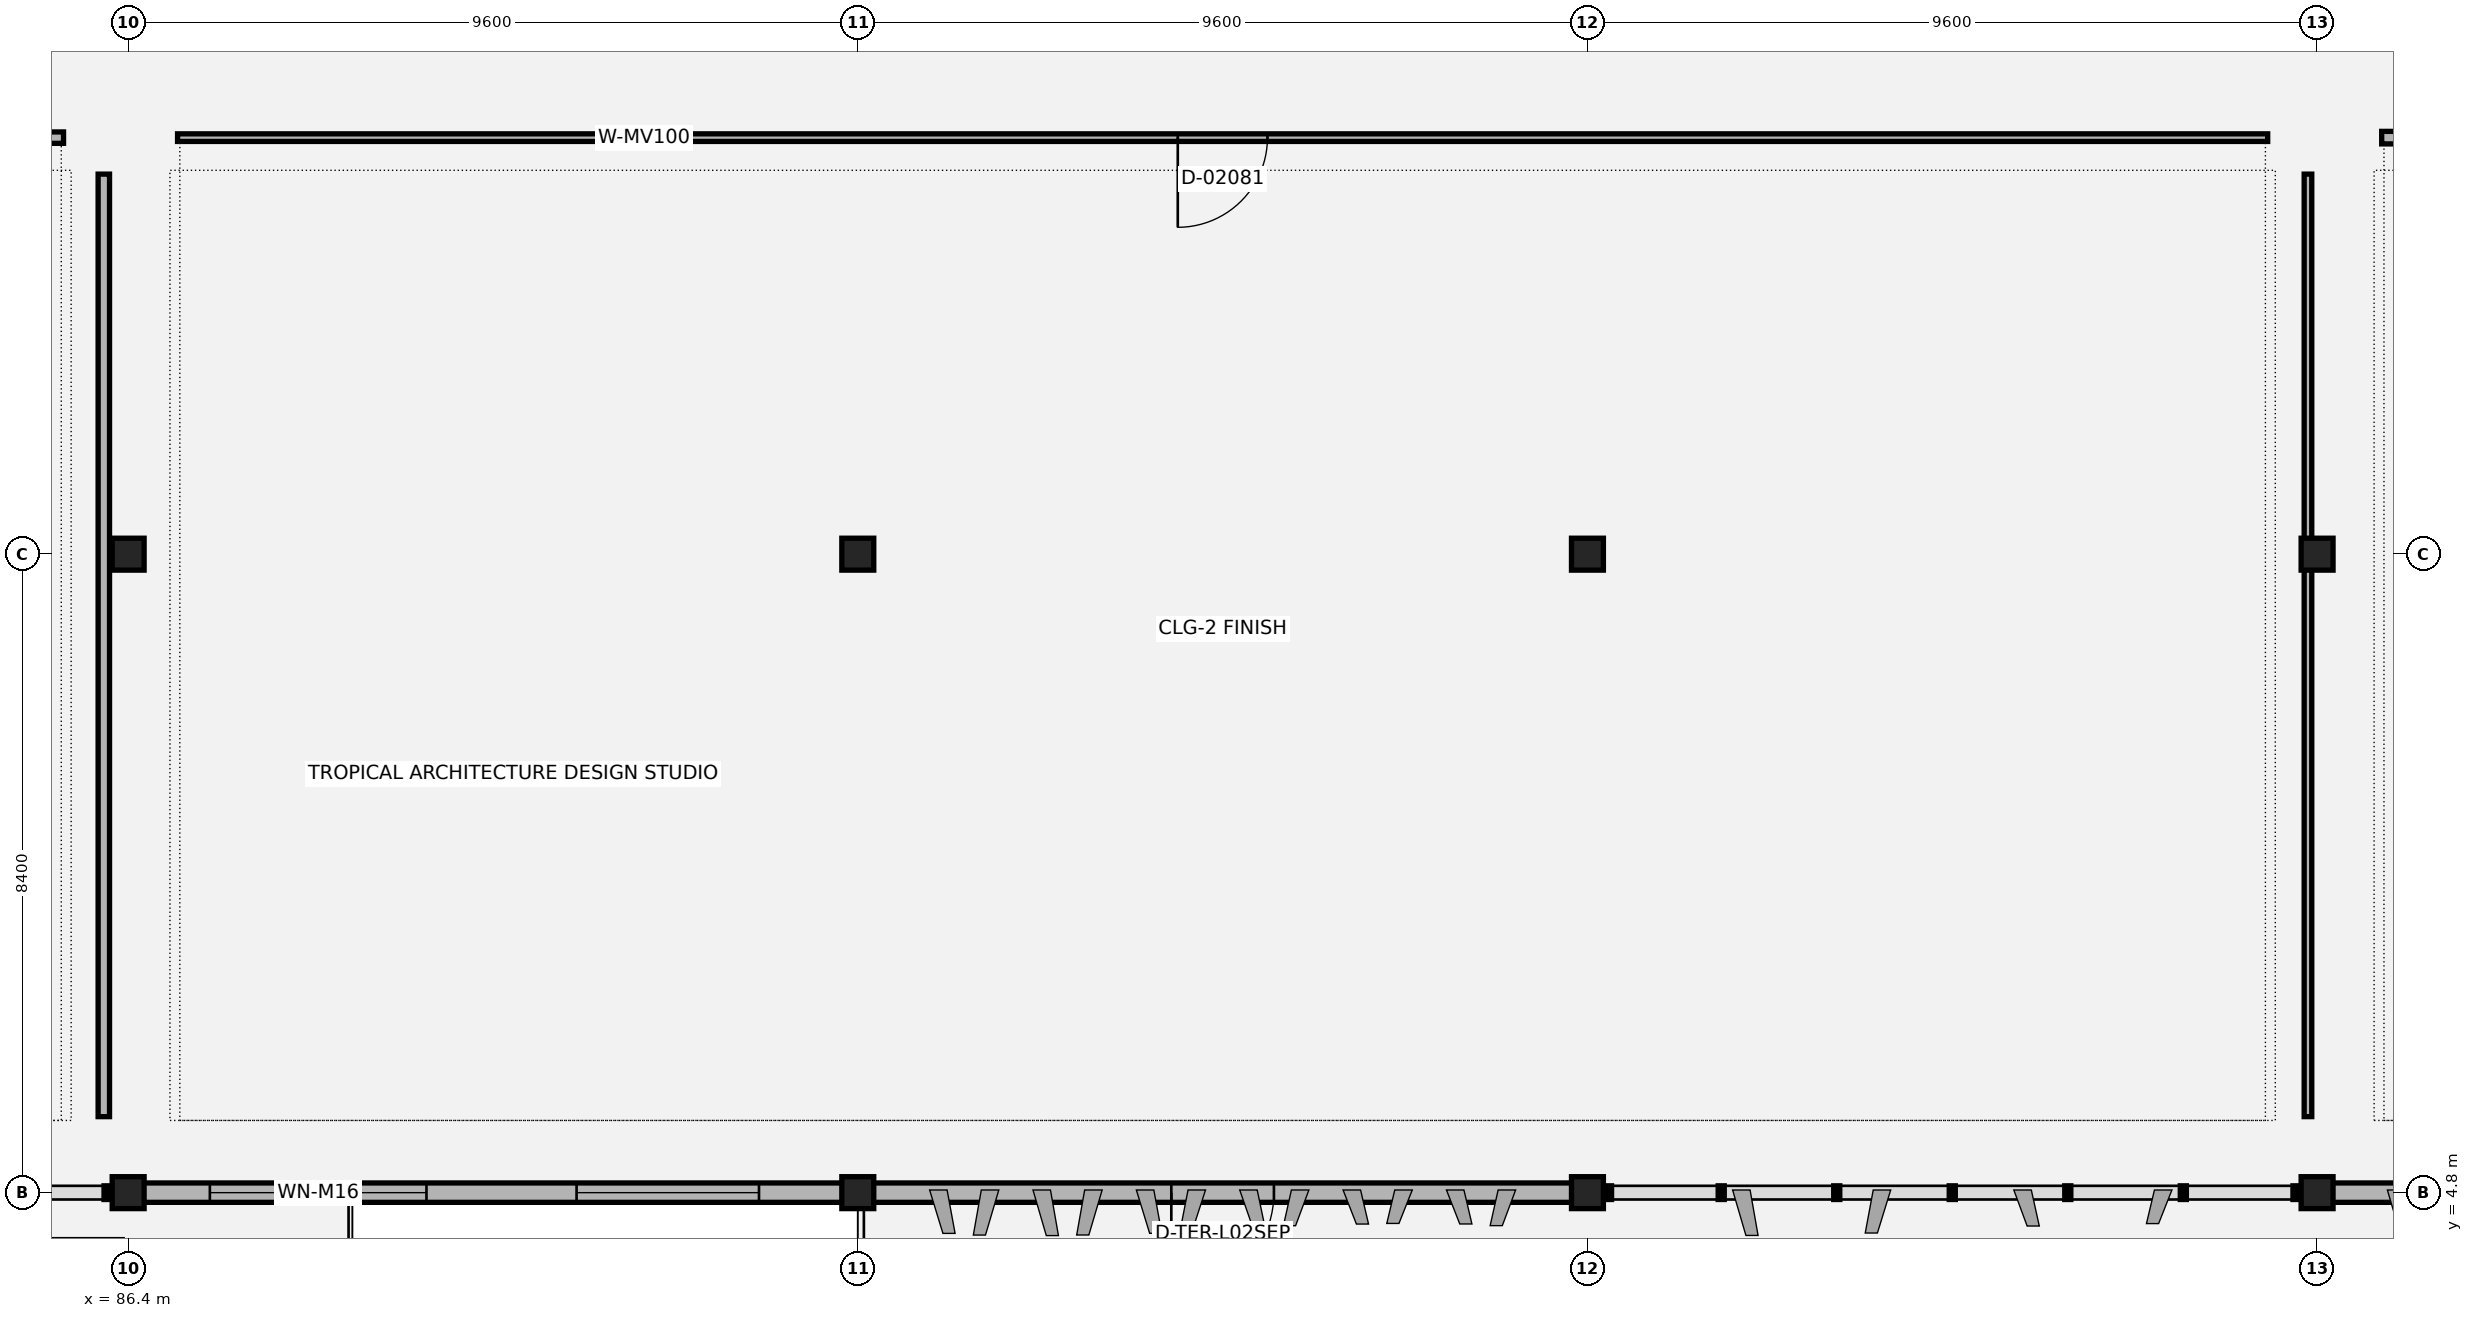
"""IFC4 building model, lengths in metres.
Left out: names, types, materials, properties, quantities, classifications, styles, units other than length and angle.
Written with IfcOpenShell. Run it as: python <this file> out.ifc"""

import sys

from ifc_helpers import new_model, si_unit, direction, frame, frame_2d, origin, origin_2d, place, context, subcontext, project, spatial, rectangle, extrude, element, fill, save


model = new_model("IFC4")
c1 = context("Model", 3, precision=1e-05, world=origin(), true_north=direction((0.0, 1.0)))
c2 = subcontext(c1, "Body", "Model", "MODEL_VIEW")
j1 = project(units=[si_unit("LENGTHUNIT", "METRE"), si_unit("PLANEANGLEUNIT", "RADIAN")], contexts=[c1])
p1 = place(None, origin())
s1 = spatial("IfcSite", under=j1, at=p1, CompositionType="ELEMENT")
p2 = place(p1, origin())
s2 = spatial("IfcBuilding", under=s1, at=p2, CompositionType="ELEMENT")
p3 = place(p2, frame((0.0, 0.0, 10.2)))
s3 = spatial("IfcBuildingStorey", under=s2, at=p3, CompositionType="ELEMENT", Elevation=10.2)
for number, where, z_axis, x_axis in (
    (1, (86.4, 4.8, 0.0), (0.0, 0.0, 1.0), (1.0, 0.0, 0.0)),
    (2, (86.4, 13.2, 0.0), (0.0, 0.0, 1.0), (1.0, 0.0, 0.0)),
    (3, (96.0, 4.8, 0.0), (0.0, 0.0, 1.0), (1.0, 0.0, 0.0)),
    (4, (96.0, 13.2, 0.0), (0.0, 0.0, 1.0), (1.0, 0.0, 0.0)),
    (5, (105.6, 4.8, 0.0), (0.0, 0.0, 1.0), (1.0, 0.0, 0.0)),
    (6, (105.6, 13.2, 0.0), (0.0, 0.0, 1.0), (1.0, 0.0, 0.0)),
    (7, (115.2, 4.8, 0.0), (0.0, 0.0, 1.0), (1.0, 0.0, 0.0)),
    (8, (115.2, 13.2, 0.0), (0.0, 0.0, 1.0), (1.0, 0.0, 0.0)),
):
    element("IfcColumn", number, at=place(p3, frame(where, z_axis=z_axis, x_axis=x_axis)), inside=s3, PredefinedType="COLUMN", context=c2, shape_type="SweptSolid", body=[
        extrude(rectangle(XDim=0.42, YDim=0.42, at=origin_2d()), origin(), (0.0, 0.0, 1.0), 4.2),
    ])
p4 = place(p3, frame((86.6, 4.8, 0.0), z_axis=(0.0, 0.0, 1.0), x_axis=(1.0, 0.0, 0.0)))
e9 = element("IfcWall", 9, at=p4, inside=s3, PredefinedType="SOLIDWALL", context=c2, shape_type="SweptSolid", body=[
    extrude(rectangle(XDim=9.2, YDim=0.255, at=frame_2d((4.6, 0.0))), origin(), (0.0, 0.0, 1.0), 3.05),
])
p5 = place(p4, frame((0.875, 0.0, 0.9)))
e10 = element("IfcOpeningElement", 10, at=p5, cuts=e9, PredefinedType="OPENING", context=c2, shape_type="SweptSolid", body=[
    extrude(rectangle(XDim=2.85, YDim=1.8, at=frame_2d((1.425, 0.9))), frame((0.0, 0.137, 0.0), z_axis=(0.0, -1.0, 0.0), x_axis=(1.0, 0.0, 0.0)), (0.0, 0.0, 1.0), 0.275),
])
p6 = place(p4, frame((5.7, 0.0, 0.9)))
e11 = element("IfcOpeningElement", 11, at=p6, cuts=e9, PredefinedType="OPENING", context=c2, shape_type="SweptSolid", body=[
    extrude(rectangle(XDim=2.4, YDim=1.6, at=frame_2d((1.2, 0.8))), frame((0.0, 0.137, 0.0), z_axis=(0.0, -1.0, 0.0), x_axis=(1.0, 0.0, 0.0)), (0.0, 0.0, 1.0), 0.275),
])
p7 = place(p3, frame((96.2, 4.8, 0.0), z_axis=(0.0, 0.0, 1.0), x_axis=(1.0, 0.0, 0.0)))
e12 = element("IfcWall", 12, at=p7, inside=s3, PredefinedType="SOLIDWALL", context=c2, shape_type="SweptSolid", body=[
    extrude(rectangle(XDim=9.2, YDim=0.255, at=frame_2d((4.6, 0.0))), origin(), (0.0, 0.0, 1.0), 3.05),
])
p8 = place(p7, frame((3.925, 0.0, 0.0)))
e13 = element("IfcOpeningElement", 13, at=p8, cuts=e12, PredefinedType="OPENING", context=c2, shape_type="SweptSolid", body=[
    extrude(rectangle(XDim=1.35, YDim=2.15, at=frame_2d((0.675, 1.075))), frame((0.0, 0.137, 0.0), z_axis=(0.0, -1.0, 0.0), x_axis=(1.0, 0.0, 0.0)), (0.0, 0.0, 1.0), 0.275),
])
p9 = place(p3, frame((115.4, 4.8, 0.0), z_axis=(0.0, 0.0, 1.0), x_axis=(1.0, 0.0, 0.0)))
e14 = element("IfcWall", 14, at=p9, inside=s3, PredefinedType="SOLIDWALL", context=c2, shape_type="SweptSolid", body=[
    extrude(rectangle(XDim=4.4, YDim=0.255, at=frame_2d((2.2, 0.0))), origin(), (0.0, 0.0, 1.0), 3.05),
])
p10 = place(p9, frame((1.45, 0.0, 0.9)))
e15 = element("IfcOpeningElement", 15, at=p10, cuts=e14, PredefinedType="OPENING", context=c2, shape_type="SweptSolid", body=[
    extrude(rectangle(XDim=1.5, YDim=1.6, at=frame_2d((0.75, 0.8))), frame((0.0, 0.137, 0.0), z_axis=(0.0, -1.0, 0.0), x_axis=(1.0, 0.0, 0.0)), (0.0, 0.0, 1.0), 0.275),
])
p11 = place(p3, frame((58.65, 18.68, 0.0), z_axis=(0.0, 0.0, 1.0), x_axis=(1.0, 0.0, 0.0)))
e16 = element("IfcWall", 16, at=p11, inside=s3, PredefinedType="PARTITIONING", context=c2, shape_type="SweptSolid", body=[
    extrude(rectangle(XDim=26.9, YDim=0.15, at=frame_2d((13.45, 0.0))), origin(), (0.0, 0.0, 1.0), 3.03),
])
p12 = place(p11, frame((12.89, 0.0, 0.0)))
e17 = element("IfcOpeningElement", 17, at=p12, cuts=e16, PredefinedType="OPENING", context=c2, shape_type="SweptSolid", body=[
    extrude(rectangle(XDim=1.12, YDim=2.15, at=frame_2d((0.56, 1.075))), frame((0.0, 0.085, 0.0), z_axis=(0.0, -1.0, 0.0), x_axis=(1.0, 0.0, 0.0)), (0.0, 0.0, 1.0), 0.17),
])
p13 = place(p3, frame((86.08, 5.8, 0.0), z_axis=(0.0, 0.0, 1.0), x_axis=(0.0, 1.0, 0.0)))
e18 = element("IfcWall", 18, at=p13, inside=s3, PredefinedType="PARTITIONING", context=c2, shape_type="SweptSolid", body=[
    extrude(rectangle(XDim=12.4, YDim=0.15, at=frame_2d((6.2, 0.0))), origin(), (0.0, 0.0, 1.0), 3.03),
])
p14 = place(p3, frame((87.05, 18.68, 0.0), z_axis=(0.0, 0.0, 1.0), x_axis=(1.0, 0.0, 0.0)))
e19 = element("IfcWall", 19, at=p14, inside=s3, PredefinedType="MOVABLE", context=c2, shape_type="SweptSolid", body=[
    extrude(rectangle(XDim=27.5, YDim=0.1, at=frame_2d((13.75, 0.0))), origin(), (0.0, 0.0, 1.0), 3.03),
])
p15 = place(p14, frame((13.16, 0.0, 0.0)))
e20 = element("IfcOpeningElement", 20, at=p15, cuts=e19, PredefinedType="OPENING", context=c2, shape_type="SweptSolid", body=[
    extrude(rectangle(XDim=1.18, YDim=2.15, at=frame_2d((0.59, 1.075))), frame((0.0, 0.06, 0.0), z_axis=(0.0, -1.0, 0.0), x_axis=(1.0, 0.0, 0.0)), (0.0, 0.0, 1.0), 0.12),
])
p16 = place(p3, frame((115.08, 5.8, 0.0), z_axis=(0.0, 0.0, 1.0), x_axis=(0.0, 1.0, 0.0)))
e21 = element("IfcWall", 21, at=p16, inside=s3, PredefinedType="MOVABLE", context=c2, shape_type="SweptSolid", body=[
    extrude(rectangle(XDim=12.4, YDim=0.1, at=frame_2d((6.2, 0.0))), origin(), (0.0, 0.0, 1.0), 3.03),
])
p17 = place(p3, frame((116.05, 18.68, 0.0), z_axis=(0.0, 0.0, 1.0), x_axis=(1.0, 0.0, 0.0)))
e22 = element("IfcWall", 22, at=p17, inside=s3, PredefinedType="PARTITIONING", context=c2, shape_type="SweptSolid", body=[
    extrude(rectangle(XDim=17.3, YDim=0.165, at=frame_2d((8.65, 0.0))), origin(), (0.0, 0.0, 1.0), 3.03),
])
p18 = place(p17, frame((12.624, 0.0, 0.0)))
e23 = element("IfcOpeningElement", 23, at=p18, cuts=e22, PredefinedType="OPENING", context=c2, shape_type="SweptSolid", body=[
    extrude(rectangle(XDim=1.22, YDim=2.15, at=frame_2d((0.61, 1.075))), frame((0.0, 0.093, 0.0), z_axis=(0.0, -1.0, 0.0), x_axis=(1.0, 0.0, 0.0)), (0.0, 0.0, 1.0), 0.185),
])
p19 = place(p5, origin())
e24 = element("IfcWindow", 24, at=p19, inside=s3, PartitioningType="SINGLE_PANEL", PredefinedType="WINDOW", context=c2, shape_type="SweptSolid", body=[
    extrude(rectangle(XDim=2.85, YDim=1.8, at=frame_2d((1.425, 0.9))), frame((0.0, 0.03, 0.0), z_axis=(0.0, -1.0, 0.0), x_axis=(1.0, 0.0, 0.0)), (0.0, 0.0, 1.0), 0.06),
])
fill(e10, e24)
p20 = place(p6, origin())
e25 = element("IfcWindow", 25, at=p20, inside=s3, PartitioningType="SINGLE_PANEL", PredefinedType="WINDOW", context=c2, shape_type="SweptSolid", body=[
    extrude(rectangle(XDim=2.4, YDim=1.6, at=frame_2d((1.2, 0.8))), frame((0.0, 0.03, 0.0), z_axis=(0.0, -1.0, 0.0), x_axis=(1.0, 0.0, 0.0)), (0.0, 0.0, 1.0), 0.06),
])
fill(e11, e25)
p21 = place(p8, origin())
e26 = element("IfcDoor", 26, at=p21, inside=s3, OperationType="SINGLE_SWING_RIGHT", PredefinedType="DOOR", context=c2, shape_type="SweptSolid", body=[
    extrude(rectangle(XDim=1.35, YDim=2.15, at=frame_2d((0.675, 1.075))), frame((0.0, 0.025, 0.0), z_axis=(0.0, -1.0, 0.0), x_axis=(1.0, 0.0, 0.0)), (0.0, 0.0, 1.0), 0.05),
])
fill(e13, e26)
p22 = place(p15, origin())
e27 = element("IfcDoor", 27, at=p22, inside=s3, OperationType="SINGLE_SWING_RIGHT", PredefinedType="DOOR", context=c2, shape_type="SweptSolid", body=[
    extrude(rectangle(XDim=1.18, YDim=2.15, at=frame_2d((0.59, 1.075))), frame((0.0, 0.025, 0.0), z_axis=(0.0, -1.0, 0.0), x_axis=(1.0, 0.0, 0.0)), (0.0, 0.0, 1.0), 0.05),
])
fill(e20, e27)
save(model, sys.argv[1])
